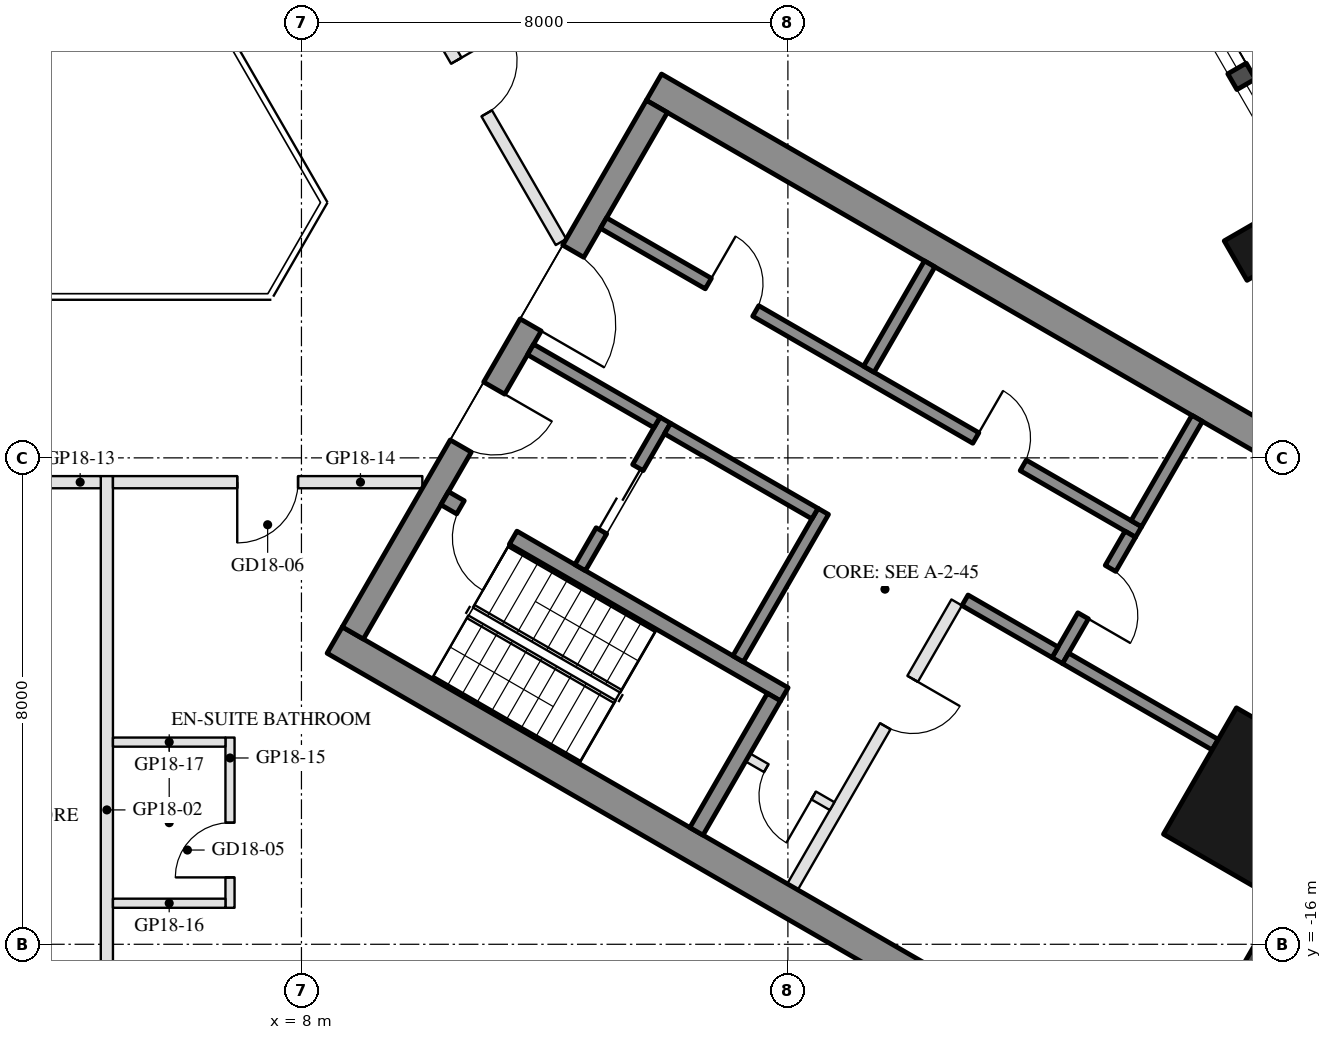
"""IFC4 building model, lengths in metres.
Left out: names, types, materials, properties, quantities, classifications, styles, units other than length and angle.
Written with IfcOpenShell. Run it as: python <this file> out.ifc"""

import sys

from ifc_helpers import new_model, si_unit, direction, frame, frame_2d, origin, origin_2d, place, context, subcontext, project, spatial, rectangle, hollow_rectangle, extrude, element, fill, save


model = new_model("IFC4")
c1 = context("Model", 3, precision=1e-05, world=origin(), true_north=direction((0.0, 1.0)))
c2 = subcontext(c1, "Body", "Model", "MODEL_VIEW")
j1 = project(units=[si_unit("LENGTHUNIT", "METRE"), si_unit("PLANEANGLEUNIT", "RADIAN")], contexts=[c1])
p1 = place(None, origin())
s1 = spatial("IfcSite", under=j1, at=p1, CompositionType="ELEMENT")
p2 = place(p1, origin())
s2 = spatial("IfcBuilding", under=s1, at=p2, CompositionType="ELEMENT")
p3 = place(p2, frame((0.0, 0.0, 191.0)))
s3 = spatial("IfcBuildingStorey", under=s2, at=p3, CompositionType="ELEMENT", Elevation=191.0)
p4 = place(p3, frame((23.688, -4.568, 0.0), z_axis=(0.0, 0.0, 1.0), x_axis=(-0.5, 0.866025403784, 0.0)))
e1 = element("IfcColumn", 1, at=p4, inside=s3, PredefinedType="COLUMN", context=c2, shape_type="SweptSolid", body=[
    extrude(hollow_rectangle(XDim=0.75, YDim=0.75, WallThickness=0.035, at=origin_2d()), origin(), (0.0, 0.0, 1.0), 3.7),
])
p5 = place(p3, frame((23.729, -13.7, 0.0), z_axis=(0.0, 0.0, 1.0), x_axis=(0.5, 0.866025403784, 0.0)))
e2 = element("IfcColumn", 2, at=p5, inside=s3, PredefinedType="COLUMN", context=c2, shape_type="SweptSolid", body=[
    extrude(hollow_rectangle(XDim=2.4, YDim=2.2, WallThickness=0.06, at=origin_2d()), origin(), (0.0, 0.0, 1.0), 3.7),
])
p6 = place(p3, frame((23.427, -16.792, 0.0), z_axis=(0.0, 0.0, 1.0), x_axis=(0.500018773155, 0.866014564827, 0.0)))
e3 = element("IfcWall", 3, at=p6, inside=s3, PredefinedType="SOLIDWALL", context=c2, shape_type="SweptSolid", body=[
    extrude(rectangle(XDim=5.658, YDim=0.35, at=frame_2d((2.829, 0.0))), origin(), (0.0, 0.0, 1.0), 3.55),
])
p7 = place(p3, frame((26.257, -6.567, 0.0), z_axis=(0.0, 0.0, 1.0), x_axis=(-0.500023526245, 0.866011820475, 0.0)))
e4 = element("IfcWall", 4, at=p7, inside=s3, PredefinedType="SOLIDWALL", context=c2, shape_type="SweptSolid", body=[
    extrude(rectangle(XDim=11.816, YDim=0.35, at=frame_2d((5.908, 0.0))), origin(), (0.0, 0.0, 1.0), 3.55),
])
p8 = place(p7, frame((0.38, 0.0, 0.3)))
e5 = element("IfcOpeningElement", 5, at=p8, cuts=e4, PredefinedType="OPENING", context=c2, shape_type="SweptSolid", body=[
    extrude(rectangle(XDim=1.9, YDim=2.65, at=frame_2d((0.95, 1.325))), frame((0.0, 0.185, 0.0), z_axis=(0.0, -1.0, 0.0), x_axis=(1.0, 0.0, 0.0)), (0.0, 0.0, 1.0), 0.37),
])
p9 = place(p7, frame((7.791, 0.0, 0.0)))
e6 = element("IfcOpeningElement", 6, at=p9, cuts=e4, PredefinedType="OPENING", context=c2, shape_type="SweptSolid", body=[
    extrude(rectangle(XDim=2.4, YDim=2.4, at=frame_2d((1.2, 1.2))), frame((0.0, 0.185, 0.0), z_axis=(0.0, -1.0, 0.0), x_axis=(1.0, 0.0, 0.0)), (0.0, 0.0, 1.0), 0.37),
])
p10 = place(p7, frame((3.741, 0.0, 0.3)))
e7 = element("IfcOpeningElement", 7, at=p10, cuts=e4, PredefinedType="OPENING", context=c2, shape_type="SweptSolid", body=[
    extrude(rectangle(XDim=1.7, YDim=2.65, at=frame_2d((0.85, 1.325))), frame((0.0, 0.185, 0.0), z_axis=(0.0, -1.0, 0.0), x_axis=(1.0, 0.0, 0.0)), (0.0, 0.0, 1.0), 0.37),
])
p11 = place(p7, frame((5.741, 0.0, 0.3)))
e8 = element("IfcOpeningElement", 8, at=p11, cuts=e4, PredefinedType="OPENING", context=c2, shape_type="SweptSolid", body=[
    extrude(rectangle(XDim=1.7, YDim=2.65, at=frame_2d((0.85, 1.325))), frame((0.0, 0.185, 0.0), z_axis=(0.0, -1.0, 0.0), x_axis=(1.0, 0.0, 0.0)), (0.0, 0.0, 1.0), 0.37),
])
for number, where, z_axis, x_axis in (
    (9, (8.547, -10.997, 0.0), (0.0, 0.0, 1.0), (0.866, -0.5, 0.0)),
    (10, (13.797, -1.903, 0.0), (0.0, 0.0, 1.0), (0.866, -0.5, 0.0)),
):
    element("IfcWall", number, at=place(p3, frame(where, z_axis=z_axis, x_axis=x_axis)), inside=s3, PredefinedType="SHEAR", context=c2, shape_type="SweptSolid", body=[
        extrude(rectangle(XDim=14.837, YDim=0.5, at=frame_2d((7.418, 0.0))), origin(), (0.0, 0.0, 1.0), 3.5),
    ])
p12 = place(p3, frame((8.845, -10.88, 0.0), z_axis=(0.0, 0.0, 1.0), x_axis=(0.500004234368, 0.866022959057, 0.0)))
e11 = element("IfcWall", 11, at=p12, inside=s3, PredefinedType="SHEAR", context=c2, shape_type="SweptSolid", body=[
    extrude(rectangle(XDim=10.0, YDim=0.4, at=frame_2d((5.0, 0.0))), origin(), (0.0, 0.0, 1.0), 3.5),
])
p13 = place(p12, frame((3.55, 0.0, 0.0)))
e12 = element("IfcOpeningElement", 12, at=p13, cuts=e11, PredefinedType="OPENING", context=c2, shape_type="SweptSolid", body=[
    extrude(rectangle(XDim=1.1, YDim=2.1, at=frame_2d((0.55, 1.05))), frame((0.0, 0.21, 0.0), z_axis=(0.0, -1.0, 0.0), x_axis=(1.0, 0.0, 0.0)), (0.0, 0.0, 1.0), 0.42),
])
p14 = place(p12, frame((5.85, 0.0, 0.0)))
e13 = element("IfcOpeningElement", 13, at=p14, cuts=e11, PredefinedType="OPENING", context=c2, shape_type="SweptSolid", body=[
    extrude(rectangle(XDim=1.4, YDim=2.1, at=frame_2d((0.7, 1.05))), frame((0.0, 0.21, 0.0), z_axis=(0.0, -1.0, 0.0), x_axis=(1.0, 0.0, 0.0)), (0.0, 0.0, 1.0), 0.42),
])
p15 = place(p3, frame((10.356, -8.664, 0.0), z_axis=(0.0, 0.0, 1.0), x_axis=(0.866028629588, -0.499994412703, 0.0)))
e14 = element("IfcWall", 14, at=p15, inside=s3, PredefinedType="SHEAR", context=c2, shape_type="SweptSolid", body=[
    extrude(rectangle(XDim=6.45, YDim=0.25, at=frame_2d((3.225, 0.0))), origin(), (0.0, 0.0, 1.0), 3.5),
])
p16 = place(p15, frame((0.3, 0.0, 0.0)))
e15 = element("IfcOpeningElement", 15, at=p16, cuts=e14, PredefinedType="OPENING", context=c2, shape_type="SweptSolid", body=[
    extrude(rectangle(XDim=1.0, YDim=2.1, at=frame_2d((0.5, 1.05))), frame((0.0, 0.135, 0.0), z_axis=(0.0, -1.0, 0.0), x_axis=(1.0, 0.0, 0.0)), (0.0, 0.0, 1.0), 0.27),
])
p17 = place(p3, frame((14.496, -14.143, 0.0), z_axis=(0.0, 0.0, 1.0), x_axis=(0.500062241894, 0.865989465428, 0.0)))
e16 = element("IfcWall", 16, at=p17, inside=s3, PredefinedType="SHEAR", context=c2, shape_type="SweptSolid", body=[
    extrude(rectangle(XDim=2.55, YDim=0.25, at=frame_2d((1.275, 0.0))), origin(), (0.0, 0.0, 1.0), 3.5),
])
p18 = place(p3, frame((15.181, -11.305, 0.0), z_axis=(0.0, 0.0, 1.0), x_axis=(0.49994636267, 0.866056369097, 0.0)))
e17 = element("IfcWall", 17, at=p18, inside=s3, PredefinedType="SHEAR", context=c2, shape_type="SweptSolid", body=[
    extrude(rectangle(XDim=2.8, YDim=0.2, at=frame_2d((1.4, 0.0))), origin(), (0.0, 0.0, 1.0), 3.5),
])
p19 = place(p3, frame((12.583, -9.805, 0.0), z_axis=(0.0, 0.0, 1.0), x_axis=(0.49994636267, 0.866056369097, 0.0)))
e18 = element("IfcWall", 18, at=p19, inside=s3, PredefinedType="SHEAR", context=c2, shape_type="SweptSolid", body=[
    extrude(rectangle(XDim=2.8, YDim=0.2, at=frame_2d((1.4, 0.0))), origin(), (0.0, 0.0, 1.0), 3.5),
])
p20 = place(p19, frame((0.7, 0.0, 0.0)))
e19 = element("IfcOpeningElement", 19, at=p20, cuts=e18, PredefinedType="OPENING", context=c2, shape_type="SweptSolid", body=[
    extrude(rectangle(XDim=1.2, YDim=2.1, at=frame_2d((0.6, 1.05))), frame((0.0, 0.11, 0.0), z_axis=(0.0, -1.0, 0.0), x_axis=(1.0, 0.0, 0.0)), (0.0, 0.0, 1.0), 0.22),
])
p21 = place(p3, frame((11.768, -6.217, 0.0), z_axis=(0.0, 0.0, 1.0), x_axis=(0.866050077142, -0.499957262057, 0.0)))
e20 = element("IfcWall", 20, at=p21, inside=s3, PredefinedType="SHEAR", context=c2, shape_type="SweptSolid", body=[
    extrude(rectangle(XDim=2.4, YDim=0.2, at=frame_2d((1.2, 0.0))), origin(), (0.0, 0.0, 1.0), 3.5),
])
p22 = place(p3, frame((14.02, -7.517, 0.0), z_axis=(0.0, 0.0, 1.0), x_axis=(0.866034573852, -0.49998411664, 0.0)))
e21 = element("IfcWall", 21, at=p22, inside=s3, PredefinedType="SHEAR", context=c2, shape_type="SweptSolid", body=[
    extrude(rectangle(XDim=2.8, YDim=0.2, at=frame_2d((1.4, 0.0))), origin(), (0.0, 0.0, 1.0), 3.5),
])
p23 = place(p3, frame((12.968, -4.138, 0.0), z_axis=(0.0, 0.0, 1.0), x_axis=(0.866028328073, -0.49999493495, 0.0)))
e22 = element("IfcWall", 22, at=p23, inside=s3, PredefinedType="SHEAR", context=c2, shape_type="SweptSolid", body=[
    extrude(rectangle(XDim=10.16, YDim=0.2, at=frame_2d((5.08, 0.0))), origin(), (0.0, 0.0, 1.0), 3.5),
])
p24 = place(p23, frame((1.99, 0.0, 0.0)))
e23 = element("IfcOpeningElement", 23, at=p24, cuts=e22, PredefinedType="OPENING", context=c2, shape_type="SweptSolid", body=[
    extrude(rectangle(XDim=0.9, YDim=2.1, at=frame_2d((0.45, 1.05))), frame((0.0, 0.11, 0.0), z_axis=(0.0, -1.0, 0.0), x_axis=(1.0, 0.0, 0.0)), (0.0, 0.0, 1.0), 0.22),
])
p25 = place(p23, frame((7.07, 0.0, 0.0)))
e24 = element("IfcOpeningElement", 24, at=p25, cuts=e22, PredefinedType="OPENING", context=c2, shape_type="SweptSolid", body=[
    extrude(rectangle(XDim=0.9, YDim=2.1, at=frame_2d((0.45, 1.05))), frame((0.0, 0.11, 0.0), z_axis=(0.0, -1.0, 0.0), x_axis=(1.0, 0.0, 0.0)), (0.0, 0.0, 1.0), 0.22),
])
p26 = place(p3, frame((20.43, -11.333, 0.0), z_axis=(0.0, 0.0, 1.0), x_axis=(0.500001309137, 0.866024647952, 0.0)))
e25 = element("IfcWall", 25, at=p26, inside=s3, PredefinedType="SHEAR", context=c2, shape_type="SweptSolid", body=[
    extrude(rectangle(XDim=2.4, YDim=0.2, at=frame_2d((1.2, 0.0))), origin(), (0.0, 0.0, 1.0), 3.5),
])
p27 = place(p26, frame((0.85, 0.0, 0.0)))
e26 = element("IfcOpeningElement", 26, at=p27, cuts=e25, PredefinedType="OPENING", context=c2, shape_type="SweptSolid", body=[
    extrude(rectangle(XDim=0.9, YDim=2.1, at=frame_2d((0.45, 1.05))), frame((0.0, 0.11, 0.0), z_axis=(0.0, -1.0, 0.0), x_axis=(1.0, 0.0, 0.0)), (0.0, 0.0, 1.0), 0.22),
])
p28 = place(p3, frame((18.913, -10.342, 0.0), z_axis=(0.0, 0.0, 1.0), x_axis=(0.866038183914, -0.499977863513, 0.0)))
e27 = element("IfcWall", 27, at=p28, inside=s3, PredefinedType="SHEAR", context=c2, shape_type="SweptSolid", body=[
    extrude(rectangle(XDim=1.71, YDim=0.2, at=frame_2d((0.855, 0.0))), origin(), (0.0, 0.0, 1.0), 3.5),
])
for number, where, z_axis, x_axis in (
    (28, (17.331, -6.542, 0.0), (0.0, 0.0, 1.0), (0.5, 0.866, 0.0)),
    (29, (21.73, -9.082, 0.0), (0.0, 0.0, 1.0), (0.5, 0.866, 0.0)),
):
    element("IfcWall", number, at=place(p3, frame(where, z_axis=z_axis, x_axis=x_axis)), inside=s3, PredefinedType="SHEAR", context=c2, shape_type="SweptSolid", body=[
        extrude(rectangle(XDim=2.0, YDim=0.2, at=frame_2d((1.0, 0.0))), origin(), (0.0, 0.0, 1.0), 3.5),
    ])
p29 = place(p3, frame((20.567, -11.297, 0.0), z_axis=(0.0, 0.0, 1.0), x_axis=(0.866055327414, -0.49994816717, 0.0)))
e30 = element("IfcWall", 30, at=p29, inside=s3, PredefinedType="SHEAR", context=c2, shape_type="SweptSolid", body=[
    extrude(rectangle(XDim=2.84, YDim=0.2, at=frame_2d((1.42, 0.0))), origin(), (0.0, 0.0, 1.0), 3.5),
])
p30 = place(p3, frame((16.076, -15.055, 0.0), z_axis=(0.0, 0.0, 1.0), x_axis=(0.499995103361, 0.866028230842, 0.0)))
e31 = element("IfcWall", 31, at=p30, inside=s3, PredefinedType="PARTITIONING", context=c2, shape_type="SweptSolid", body=[
    extrude(rectangle(XDim=5.4, YDim=0.2, at=frame_2d((2.7, 0.0))), origin(), (0.0, 0.0, 1.0), 3.5),
])
p31 = place(p30, frame((3.05, 0.0, 0.0)))
e32 = element("IfcOpeningElement", 32, at=p31, cuts=e31, PredefinedType="OPENING", context=c2, shape_type="SweptSolid", body=[
    extrude(rectangle(XDim=0.9, YDim=2.1, at=frame_2d((0.45, 1.05))), frame((0.0, 0.11, 0.0), z_axis=(0.0, -1.0, 0.0), x_axis=(1.0, 0.0, 0.0)), (0.0, 0.0, 1.0), 0.22),
])
p32 = place(p3, frame((15.342, -12.928, 0.0), z_axis=(0.0, 0.0, 1.0), x_axis=(0.865989903783, -0.500061482766, 0.0)))
e33 = element("IfcWall", 33, at=p32, inside=s3, PredefinedType="PARTITIONING", context=c2, shape_type="SweptSolid", body=[
    extrude(rectangle(XDim=1.6, YDim=0.15, at=frame_2d((0.8, 0.0))), origin(), (0.0, 0.0, 1.0), 3.5),
])
p33 = place(p32, frame((0.35, 0.0, 0.0)))
e34 = element("IfcOpeningElement", 34, at=p33, cuts=e33, PredefinedType="OPENING", context=c2, shape_type="SweptSolid", body=[
    extrude(rectangle(XDim=0.9, YDim=2.1, at=frame_2d((0.45, 1.05))), frame((0.0, 0.085, 0.0), z_axis=(0.0, -1.0, 0.0), x_axis=(1.0, 0.0, 0.0)), (0.0, 0.0, 1.0), 0.17),
])
p34 = place(p3, frame((4.8, -19.28, 0.0), z_axis=(0.0, 0.0, 1.0), x_axis=(0.0, 1.0, 0.0)))
e35 = element("IfcWall", 35, at=p34, inside=s3, PredefinedType="PARTITIONING", context=c2, shape_type="SweptSolid", body=[
    extrude(rectangle(XDim=10.98, YDim=0.2, at=frame_2d((5.49, 0.0))), origin(), (0.0, 0.0, 1.0), 3.06),
])
p35 = place(p3, frame((4.7, -8.4, 0.0), z_axis=(0.0, 0.0, 1.0), x_axis=(-1.0, 0.0, 0.0)))
e36 = element("IfcWall", 36, at=p35, inside=s3, PredefinedType="PARTITIONING", context=c2, shape_type="SweptSolid", body=[
    extrude(rectangle(XDim=2.826, YDim=0.2, at=frame_2d((1.413, 0.0))), origin(), (0.0, 0.0, 1.0), 2.95),
])
p36 = place(p35, frame((0.963, 0.0, 0.0)))
e37 = element("IfcOpeningElement", 37, at=p36, cuts=e36, PredefinedType="OPENING", context=c2, shape_type="SweptSolid", body=[
    extrude(rectangle(XDim=0.9, YDim=2.1, at=frame_2d((0.45, 1.05))), frame((0.0, 0.11, 0.0), z_axis=(0.0, -1.0, 0.0), x_axis=(1.0, 0.0, 0.0)), (0.0, 0.0, 1.0), 0.22),
])
p37 = place(p3, frame((9.988, -8.4, 0.0), z_axis=(0.0, 0.0, 1.0), x_axis=(-1.0, 0.0, 0.0)))
e38 = element("IfcWall", 38, at=p37, inside=s3, PredefinedType="PARTITIONING", context=c2, shape_type="SweptSolid", body=[
    extrude(rectangle(XDim=5.088, YDim=0.2, at=frame_2d((2.544, 0.0))), origin(), (0.0, 0.0, 1.0), 2.95),
])
p38 = place(p37, frame((2.044, 0.0, 0.0)))
e39 = element("IfcOpeningElement", 39, at=p38, cuts=e38, PredefinedType="OPENING", context=c2, shape_type="SweptSolid", body=[
    extrude(rectangle(XDim=1.0, YDim=2.1, at=frame_2d((0.5, 1.05))), frame((0.0, 0.11, 0.0), z_axis=(0.0, -1.0, 0.0), x_axis=(1.0, 0.0, 0.0)), (0.0, 0.0, 1.0), 0.22),
])
p39 = place(p3, frame((6.825, -15.4, 0.0), z_axis=(0.0, 0.0, 1.0), x_axis=(0.0, 1.0, 0.0)))
e40 = element("IfcWall", 40, at=p39, inside=s3, PredefinedType="PARTITIONING", context=c2, shape_type="SweptSolid", body=[
    extrude(rectangle(XDim=2.8, YDim=0.15, at=frame_2d((1.4, 0.0))), origin(), (0.0, 0.0, 1.0), 3.55),
])
p40 = place(p39, frame((0.5, 0.0, 0.0)))
e41 = element("IfcOpeningElement", 41, at=p40, cuts=e40, PredefinedType="OPENING", context=c2, shape_type="SweptSolid", body=[
    extrude(rectangle(XDim=0.9, YDim=2.1, at=frame_2d((0.45, 1.05))), frame((0.0, 0.085, 0.0), z_axis=(0.0, -1.0, 0.0), x_axis=(1.0, 0.0, 0.0)), (0.0, 0.0, 1.0), 0.17),
])
for number, where, z_axis, x_axis in (
    (42, (4.9, -15.325, 0.0), (0.0, 0.0, 1.0), (1.0, 0.0, 0.0)),
    (43, (4.9, -12.675, 0.0), (0.0, 0.0, 1.0), (1.0, 0.0, 0.0)),
):
    element("IfcWall", number, at=place(p3, frame(where, z_axis=z_axis, x_axis=x_axis)), inside=s3, PredefinedType="PARTITIONING", context=c2, shape_type="SweptSolid", body=[
        extrude(rectangle(XDim=1.85, YDim=0.15, at=frame_2d((0.925, 0.0))), origin(), (0.0, 0.0, 1.0), 3.55),
    ])
p41 = place(p3, frame((9.325, 0.649, 0.0), z_axis=(0.0, 0.0, 1.0), x_axis=(0.500032331163, -0.866006736574, 0.0)))
e44 = element("IfcWall", 44, at=p41, inside=s3, PredefinedType="PARTITIONING", context=c2, shape_type="SweptSolid", body=[
    extrude(rectangle(XDim=5.888, YDim=0.2, at=frame_2d((2.944, 0.0))), origin(), (0.0, 0.0, 1.0), 2.95),
])
p42 = place(p41, frame((2.444, 0.0, 0.0)))
e45 = element("IfcOpeningElement", 45, at=p42, cuts=e44, PredefinedType="OPENING", context=c2, shape_type="SweptSolid", body=[
    extrude(rectangle(XDim=1.0, YDim=2.1, at=frame_2d((0.5, 1.05))), frame((0.0, 0.11, 0.0), z_axis=(0.0, -1.0, 0.0), x_axis=(1.0, 0.0, 0.0)), (0.0, 0.0, 1.0), 0.22),
])
p43 = place(p10, origin())
e46 = element("IfcWindow", 46, at=p43, inside=s3, PartitioningType="SINGLE_PANEL", PredefinedType="WINDOW", context=c2, shape_type="SweptSolid", body=[
    extrude(rectangle(XDim=1.7, YDim=2.65, at=frame_2d((0.85, 1.325))), frame((0.0, 0.03, 0.0), z_axis=(0.0, -1.0, 0.0), x_axis=(1.0, 0.0, 0.0)), (0.0, 0.0, 1.0), 0.06),
])
fill(e7, e46)
p44 = place(p11, origin())
e47 = element("IfcWindow", 47, at=p44, inside=s3, PartitioningType="SINGLE_PANEL", PredefinedType="WINDOW", context=c2, shape_type="SweptSolid", body=[
    extrude(rectangle(XDim=1.7, YDim=2.65, at=frame_2d((0.85, 1.325))), frame((0.0, 0.03, 0.0), z_axis=(0.0, -1.0, 0.0), x_axis=(1.0, 0.0, 0.0)), (0.0, 0.0, 1.0), 0.06),
])
fill(e8, e47)
p45 = place(p20, origin())
e48 = element("IfcDoor", 48, at=p45, inside=s3, OperationType="DOUBLE_DOOR_SLIDING", PredefinedType="DOOR", context=c2, shape_type="SweptSolid", body=[
    extrude(rectangle(XDim=1.2, YDim=2.1, at=frame_2d((0.6, 1.05))), frame((0.0, 0.025, 0.0), z_axis=(0.0, -1.0, 0.0), x_axis=(1.0, 0.0, 0.0)), (0.0, 0.0, 1.0), 0.05),
])
fill(e19, e48)
p46 = place(p33, frame((0.9, 0.0, 0.0), z_axis=(0.0, 0.0, 1.0), x_axis=(-1.0, 0.0, 0.0)))
e49 = element("IfcDoor", 49, at=p46, inside=s3, OperationType="SINGLE_SWING_LEFT", PredefinedType="DOOR", context=c2, shape_type="SweptSolid", body=[
    extrude(rectangle(XDim=0.9, YDim=2.1, at=frame_2d((0.45, 1.05))), frame((0.0, 0.025, 0.0), z_axis=(0.0, -1.0, 0.0), x_axis=(1.0, 0.0, 0.0)), (0.0, 0.0, 1.0), 0.05),
])
fill(e34, e49)
p47 = place(p24, origin())
e50 = element("IfcDoor", 50, at=p47, inside=s3, OperationType="SINGLE_SWING_LEFT", PredefinedType="DOOR", context=c2, shape_type="SweptSolid", body=[
    extrude(rectangle(XDim=0.9, YDim=2.1, at=frame_2d((0.45, 1.05))), frame((0.0, 0.025, 0.0), z_axis=(0.0, -1.0, 0.0), x_axis=(1.0, 0.0, 0.0)), (0.0, 0.0, 1.0), 0.05),
])
fill(e23, e50)
p48 = place(p25, origin())
e51 = element("IfcDoor", 51, at=p48, inside=s3, OperationType="SINGLE_SWING_LEFT", PredefinedType="DOOR", context=c2, shape_type="SweptSolid", body=[
    extrude(rectangle(XDim=0.9, YDim=2.1, at=frame_2d((0.45, 1.05))), frame((0.0, 0.025, 0.0), z_axis=(0.0, -1.0, 0.0), x_axis=(1.0, 0.0, 0.0)), (0.0, 0.0, 1.0), 0.05),
])
fill(e24, e51)
p49 = place(p27, frame((0.9, 0.0, 0.0), z_axis=(0.0, 0.0, 1.0), x_axis=(-1.0, 0.0, 0.0)))
e52 = element("IfcDoor", 52, at=p49, inside=s3, OperationType="SINGLE_SWING_RIGHT", PredefinedType="DOOR", context=c2, shape_type="SweptSolid", body=[
    extrude(rectangle(XDim=0.9, YDim=2.1, at=frame_2d((0.45, 1.05))), frame((0.0, 0.025, 0.0), z_axis=(0.0, -1.0, 0.0), x_axis=(1.0, 0.0, 0.0)), (0.0, 0.0, 1.0), 0.05),
])
fill(e26, e52)
p50 = place(p31, frame((0.9, 0.0, 0.0), z_axis=(0.0, 0.0, 1.0), x_axis=(-1.0, 0.0, 0.0)))
e53 = element("IfcDoor", 53, at=p50, inside=s3, OperationType="SINGLE_SWING_LEFT", PredefinedType="DOOR", context=c2, shape_type="SweptSolid", body=[
    extrude(rectangle(XDim=0.9, YDim=2.1, at=frame_2d((0.45, 1.05))), frame((0.0, 0.025, 0.0), z_axis=(0.0, -1.0, 0.0), x_axis=(1.0, 0.0, 0.0)), (0.0, 0.0, 1.0), 0.05),
])
fill(e32, e53)
p51 = place(p13, frame((1.1, 0.0, 0.0), z_axis=(0.0, 0.0, 1.0), x_axis=(-1.0, 0.0, 0.0)))
e54 = element("IfcDoor", 54, at=p51, inside=s3, OperationType="SINGLE_SWING_LEFT", PredefinedType="DOOR", context=c2, shape_type="SweptSolid", body=[
    extrude(rectangle(XDim=1.1, YDim=2.1, at=frame_2d((0.55, 1.05))), frame((0.0, 0.025, 0.0), z_axis=(0.0, -1.0, 0.0), x_axis=(1.0, 0.0, 0.0)), (0.0, 0.0, 1.0), 0.05),
])
fill(e12, e54)
p52 = place(p14, frame((1.4, 0.0, 0.0), z_axis=(0.0, 0.0, 1.0), x_axis=(-1.0, 0.0, 0.0)))
e55 = element("IfcDoor", 55, at=p52, inside=s3, OperationType="DOUBLE_DOOR_SINGLE_SWING", PredefinedType="DOOR", context=c2, shape_type="SweptSolid", body=[
    extrude(rectangle(XDim=1.4, YDim=2.1, at=frame_2d((0.7, 1.05))), frame((0.0, 0.025, 0.0), z_axis=(0.0, -1.0, 0.0), x_axis=(1.0, 0.0, 0.0)), (0.0, 0.0, 1.0), 0.05),
])
fill(e13, e55)
p53 = place(p16, frame((1.0, 0.0, 0.0), z_axis=(0.0, 0.0, 1.0), x_axis=(-1.0, 0.0, 0.0)))
e56 = element("IfcDoor", 56, at=p53, inside=s3, OperationType="SINGLE_SWING_LEFT", PredefinedType="DOOR", context=c2, shape_type="SweptSolid", body=[
    extrude(rectangle(XDim=1.0, YDim=2.1, at=frame_2d((0.5, 1.05))), frame((0.0, 0.025, 0.0), z_axis=(0.0, -1.0, 0.0), x_axis=(1.0, 0.0, 0.0)), (0.0, 0.0, 1.0), 0.05),
])
fill(e15, e56)
p54 = place(p40, origin())
e57 = element("IfcDoor", 57, at=p54, inside=s3, OperationType="SINGLE_SWING_LEFT", PredefinedType="DOOR", context=c2, shape_type="SweptSolid", body=[
    extrude(rectangle(XDim=0.9, YDim=2.1, at=frame_2d((0.45, 1.05))), frame((0.0, 0.025, 0.0), z_axis=(0.0, -1.0, 0.0), x_axis=(1.0, 0.0, 0.0)), (0.0, 0.0, 1.0), 0.05),
])
fill(e41, e57)
p55 = place(p38, origin())
e58 = element("IfcDoor", 58, at=p55, inside=s3, OperationType="SINGLE_SWING_RIGHT", PredefinedType="DOOR", context=c2, shape_type="SweptSolid", body=[
    extrude(rectangle(XDim=1.0, YDim=2.1, at=frame_2d((0.5, 1.05))), frame((0.0, 0.025, 0.0), z_axis=(0.0, -1.0, 0.0), x_axis=(1.0, 0.0, 0.0)), (0.0, 0.0, 1.0), 0.05),
])
fill(e39, e58)
p56 = place(p42, origin())
e59 = element("IfcDoor", 59, at=p56, inside=s3, OperationType="SINGLE_SWING_LEFT", PredefinedType="DOOR", context=c2, shape_type="SweptSolid", body=[
    extrude(rectangle(XDim=1.0, YDim=2.1, at=frame_2d((0.5, 1.05))), frame((0.0, 0.025, 0.0), z_axis=(0.0, -1.0, 0.0), x_axis=(1.0, 0.0, 0.0)), (0.0, 0.0, 1.0), 0.05),
])
fill(e45, e59)
save(model, sys.argv[1])
